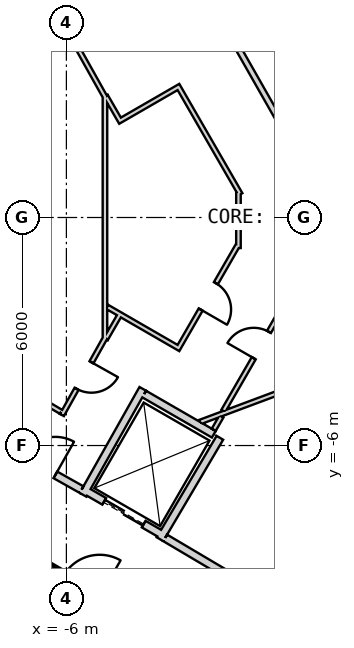
"""IFC4 building model, lengths in metres.
Left out: names, types, materials, properties, quantities, classifications, styles, units other than length and angle.
Written with IfcOpenShell. Run it as: python <this file> out.ifc"""

import sys

from ifc_helpers import new_model, si_unit, direction, frame, frame_2d, origin, place, context, subcontext, project, spatial, rectangle, extrude, element, fill, save


model = new_model("IFC4")
c1 = context("Model", 3, precision=1e-05, world=origin(), true_north=direction((0.0, 1.0)))
c2 = subcontext(c1, "Body", "Model", "MODEL_VIEW")
j1 = project(units=[si_unit("LENGTHUNIT", "METRE"), si_unit("PLANEANGLEUNIT", "RADIAN")], contexts=[c1])
p1 = place(None, origin())
s1 = spatial("IfcSite", under=j1, at=p1, CompositionType="ELEMENT")
p2 = place(p1, origin())
s2 = spatial("IfcBuilding", under=s1, at=p2, CompositionType="ELEMENT")
p3 = place(p2, frame((0.0, 0.0, 45.5)))
s3 = spatial("IfcBuildingStorey", under=s2, at=p3, CompositionType="ELEMENT", Elevation=45.5)
p4 = place(p3, frame((19.475, 2.208, 0.0), z_axis=(0.0, 0.0, 1.0), x_axis=(-0.866028369851, 0.499994862586, 0.0)))
e1 = element("IfcWall", 1, at=p4, inside=s3, PredefinedType="SHEAR", context=c2, shape_type="SweptSolid", body=[
    extrude(rectangle(XDim=31.523, YDim=0.9, at=frame_2d((15.762, 0.0))), origin(), (0.0, 0.0, 1.0), 4.1),
])
p5 = place(p4, frame((7.062, 0.0, 0.0)))
e2 = element("IfcOpeningElement", 2, at=p5, cuts=e1, PredefinedType="OPENING", context=c2, shape_type="SweptSolid", body=[
    extrude(rectangle(XDim=1.2, YDim=2.4, at=frame_2d((0.6, 1.2))), frame((0.0, 0.46, 0.0), z_axis=(0.0, -1.0, 0.0), x_axis=(1.0, 0.0, 0.0)), (0.0, 0.0, 1.0), 0.92),
])
p6 = place(p4, frame((9.762, 0.0, 0.0)))
e3 = element("IfcOpeningElement", 3, at=p6, cuts=e1, PredefinedType="OPENING", context=c2, shape_type="SweptSolid", body=[
    extrude(rectangle(XDim=1.2, YDim=2.4, at=frame_2d((0.6, 1.2))), frame((0.0, 0.46, 0.0), z_axis=(0.0, -1.0, 0.0), x_axis=(1.0, 0.0, 0.0)), (0.0, 0.0, 1.0), 0.92),
])
p7 = place(p4, frame((12.462, 0.0, 0.0)))
e4 = element("IfcOpeningElement", 4, at=p7, cuts=e1, PredefinedType="OPENING", context=c2, shape_type="SweptSolid", body=[
    extrude(rectangle(XDim=1.2, YDim=2.4, at=frame_2d((0.6, 1.2))), frame((0.0, 0.46, 0.0), z_axis=(0.0, -1.0, 0.0), x_axis=(1.0, 0.0, 0.0)), (0.0, 0.0, 1.0), 0.92),
])
p8 = place(p4, frame((15.162, 0.0, 0.0)))
e5 = element("IfcOpeningElement", 5, at=p8, cuts=e1, PredefinedType="OPENING", context=c2, shape_type="SweptSolid", body=[
    extrude(rectangle(XDim=1.2, YDim=2.4, at=frame_2d((0.6, 1.2))), frame((0.0, 0.46, 0.0), z_axis=(0.0, -1.0, 0.0), x_axis=(1.0, 0.0, 0.0)), (0.0, 0.0, 1.0), 0.92),
])
p9 = place(p4, frame((17.862, 0.0, 0.0)))
e6 = element("IfcOpeningElement", 6, at=p9, cuts=e1, PredefinedType="OPENING", context=c2, shape_type="SweptSolid", body=[
    extrude(rectangle(XDim=1.2, YDim=2.4, at=frame_2d((0.6, 1.2))), frame((0.0, 0.46, 0.0), z_axis=(0.0, -1.0, 0.0), x_axis=(1.0, 0.0, 0.0)), (0.0, 0.0, 1.0), 0.92),
])
p10 = place(p4, frame((20.562, 0.0, 0.0)))
e7 = element("IfcOpeningElement", 7, at=p10, cuts=e1, PredefinedType="OPENING", context=c2, shape_type="SweptSolid", body=[
    extrude(rectangle(XDim=1.2, YDim=2.4, at=frame_2d((0.6, 1.2))), frame((0.0, 0.46, 0.0), z_axis=(0.0, -1.0, 0.0), x_axis=(1.0, 0.0, 0.0)), (0.0, 0.0, 1.0), 0.92),
])
p11 = place(p4, frame((23.262, 0.0, 0.0)))
e8 = element("IfcOpeningElement", 8, at=p11, cuts=e1, PredefinedType="OPENING", context=c2, shape_type="SweptSolid", body=[
    extrude(rectangle(XDim=1.2, YDim=2.4, at=frame_2d((0.6, 1.2))), frame((0.0, 0.46, 0.0), z_axis=(0.0, -1.0, 0.0), x_axis=(1.0, 0.0, 0.0)), (0.0, 0.0, 1.0), 0.92),
])
p12 = place(p4, frame((3.612, 0.0, 0.0)))
e9 = element("IfcOpeningElement", 9, at=p12, cuts=e1, PredefinedType="OPENING", context=c2, shape_type="SweptSolid", body=[
    extrude(rectangle(XDim=1.2, YDim=2.4, at=frame_2d((0.6, 1.2))), frame((0.0, 0.46, 0.0), z_axis=(0.0, -1.0, 0.0), x_axis=(1.0, 0.0, 0.0)), (0.0, 0.0, 1.0), 0.92),
])
p13 = place(p4, frame((26.712, 0.0, 0.0)))
e10 = element("IfcOpeningElement", 10, at=p13, cuts=e1, PredefinedType="OPENING", context=c2, shape_type="SweptSolid", body=[
    extrude(rectangle(XDim=1.2, YDim=2.4, at=frame_2d((0.6, 1.2))), frame((0.0, 0.46, 0.0), z_axis=(0.0, -1.0, 0.0), x_axis=(1.0, 0.0, 0.0)), (0.0, 0.0, 1.0), 0.92),
])
p14 = place(p3, frame((-7.825, -17.97, 0.0), z_axis=(0.0, 0.0, 1.0), x_axis=(0.866028369851, 0.499994862586, 0.0)))
e11 = element("IfcWall", 11, at=p14, inside=s3, PredefinedType="SHEAR", context=c2, shape_type="SweptSolid", body=[
    extrude(rectangle(XDim=31.523, YDim=0.9, at=frame_2d((15.762, 0.0))), origin(), (0.0, 0.0, 1.0), 4.1),
])
p15 = place(p14, frame((7.062, 0.0, 0.0)))
e12 = element("IfcOpeningElement", 12, at=p15, cuts=e11, PredefinedType="OPENING", context=c2, shape_type="SweptSolid", body=[
    extrude(rectangle(XDim=1.2, YDim=2.4, at=frame_2d((0.6, 1.2))), frame((0.0, 0.46, 0.0), z_axis=(0.0, -1.0, 0.0), x_axis=(1.0, 0.0, 0.0)), (0.0, 0.0, 1.0), 0.92),
])
p16 = place(p14, frame((9.762, 0.0, 0.0)))
e13 = element("IfcOpeningElement", 13, at=p16, cuts=e11, PredefinedType="OPENING", context=c2, shape_type="SweptSolid", body=[
    extrude(rectangle(XDim=1.2, YDim=2.4, at=frame_2d((0.6, 1.2))), frame((0.0, 0.46, 0.0), z_axis=(0.0, -1.0, 0.0), x_axis=(1.0, 0.0, 0.0)), (0.0, 0.0, 1.0), 0.92),
])
p17 = place(p14, frame((12.462, 0.0, 0.0)))
e14 = element("IfcOpeningElement", 14, at=p17, cuts=e11, PredefinedType="OPENING", context=c2, shape_type="SweptSolid", body=[
    extrude(rectangle(XDim=1.2, YDim=2.4, at=frame_2d((0.6, 1.2))), frame((0.0, 0.46, 0.0), z_axis=(0.0, -1.0, 0.0), x_axis=(1.0, 0.0, 0.0)), (0.0, 0.0, 1.0), 0.92),
])
p18 = place(p14, frame((15.162, 0.0, 0.0)))
e15 = element("IfcOpeningElement", 15, at=p18, cuts=e11, PredefinedType="OPENING", context=c2, shape_type="SweptSolid", body=[
    extrude(rectangle(XDim=1.2, YDim=2.4, at=frame_2d((0.6, 1.2))), frame((0.0, 0.46, 0.0), z_axis=(0.0, -1.0, 0.0), x_axis=(1.0, 0.0, 0.0)), (0.0, 0.0, 1.0), 0.92),
])
p19 = place(p14, frame((17.862, 0.0, 0.0)))
e16 = element("IfcOpeningElement", 16, at=p19, cuts=e11, PredefinedType="OPENING", context=c2, shape_type="SweptSolid", body=[
    extrude(rectangle(XDim=1.2, YDim=2.4, at=frame_2d((0.6, 1.2))), frame((0.0, 0.46, 0.0), z_axis=(0.0, -1.0, 0.0), x_axis=(1.0, 0.0, 0.0)), (0.0, 0.0, 1.0), 0.92),
])
p20 = place(p14, frame((20.562, 0.0, 0.0)))
e17 = element("IfcOpeningElement", 17, at=p20, cuts=e11, PredefinedType="OPENING", context=c2, shape_type="SweptSolid", body=[
    extrude(rectangle(XDim=1.2, YDim=2.4, at=frame_2d((0.6, 1.2))), frame((0.0, 0.46, 0.0), z_axis=(0.0, -1.0, 0.0), x_axis=(1.0, 0.0, 0.0)), (0.0, 0.0, 1.0), 0.92),
])
p21 = place(p14, frame((26.712, 0.0, 0.0)))
e18 = element("IfcOpeningElement", 18, at=p21, cuts=e11, PredefinedType="OPENING", context=c2, shape_type="SweptSolid", body=[
    extrude(rectangle(XDim=1.2, YDim=2.4, at=frame_2d((0.6, 1.2))), frame((0.0, 0.46, 0.0), z_axis=(0.0, -1.0, 0.0), x_axis=(1.0, 0.0, 0.0)), (0.0, 0.0, 1.0), 0.92),
])
p22 = place(p14, frame((3.612, 0.0, 0.0)))
e19 = element("IfcOpeningElement", 19, at=p22, cuts=e11, PredefinedType="OPENING", context=c2, shape_type="SweptSolid", body=[
    extrude(rectangle(XDim=1.2, YDim=2.4, at=frame_2d((0.6, 1.2))), frame((0.0, 0.46, 0.0), z_axis=(0.0, -1.0, 0.0), x_axis=(1.0, 0.0, 0.0)), (0.0, 0.0, 1.0), 0.92),
])
p23 = place(p3, frame((-1.13, -9.831, 0.0), z_axis=(0.0, 0.0, 1.0), x_axis=(0.874269620932, 0.485440655401, 0.0)))
e20 = element("IfcWall", 20, at=p23, inside=s3, PredefinedType="PLUMBINGWALL", context=c2, shape_type="SweptSolid", body=[
    extrude(rectangle(XDim=1.845, YDim=0.2, at=frame_2d((0.922, 0.0))), origin(), (0.0, 0.0, 1.0), 3.8),
])
p24 = place(p3, frame((-4.041, -10.599, -0.3), z_axis=(0.0, 0.0, 1.0), x_axis=(-0.866047807691, 0.499961193289, 0.0)))
e21 = element("IfcWall", 21, at=p24, inside=s3, PredefinedType="SHEAR", context=c2, shape_type="SweptSolid", body=[
    extrude(rectangle(XDim=3.6, YDim=0.2, at=frame_2d((1.8, 0.0))), origin(), (0.0, 0.0, 1.0), 4.1),
])
p25 = place(p24, frame((1.25, 0.0, 0.3)))
e22 = element("IfcOpeningElement", 22, at=p25, cuts=e21, PredefinedType="OPENING", context=c2, shape_type="SweptSolid", body=[
    extrude(rectangle(XDim=1.1, YDim=2.1, at=frame_2d((0.55, 1.05))), frame((0.0, 0.11, 0.0), z_axis=(0.0, -1.0, 0.0), x_axis=(1.0, 0.0, 0.0)), (0.0, 0.0, 1.0), 0.22),
])
p26 = place(p3, frame((-3.446, -8.368, 0.0), z_axis=(0.0, 0.0, 1.0), x_axis=(-0.866024647952, 0.500001309137, 0.0)))
e23 = element("IfcWall", 23, at=p26, inside=s3, PredefinedType="PLUMBINGWALL", context=c2, shape_type="SweptSolid", body=[
    extrude(rectangle(XDim=2.4, YDim=0.2, at=frame_2d((1.2, 0.0))), origin(), (0.0, 0.0, 1.0), 3.8),
])
p27 = place(p26, frame((0.6, 0.0, 0.0)))
e24 = element("IfcOpeningElement", 24, at=p27, cuts=e23, PredefinedType="OPENING", context=c2, shape_type="SweptSolid", body=[
    extrude(rectangle(XDim=1.2, YDim=2.4, at=frame_2d((0.6, 1.2))), frame((0.0, 0.11, 0.0), z_axis=(0.0, -1.0, 0.0), x_axis=(1.0, 0.0, 0.0)), (0.0, 0.0, 1.0), 0.22),
])
p28 = place(p3, frame((-1.961, -5.796, 0.0), z_axis=(0.0, 0.0, 1.0), x_axis=(-0.508647062354, -0.860975125052, 0.0)))
e25 = element("IfcWall", 25, at=p28, inside=s3, PredefinedType="PLUMBINGWALL", context=c2, shape_type="SweptSolid", body=[
    extrude(rectangle(XDim=3.1, YDim=0.2, at=frame_2d((1.55, 0.0))), origin(), (0.0, 0.0, 1.0), 3.8),
])
p29 = place(p3, frame((-3.99, -4.509, 0.0), z_axis=(0.0, 0.0, 1.0), x_axis=(-0.491358283181, -0.870957540612, 0.0)))
e26 = element("IfcWall", 26, at=p29, inside=s3, PredefinedType="PLUMBINGWALL", context=c2, shape_type="SweptSolid", body=[
    extrude(rectangle(XDim=3.2, YDim=0.2, at=frame_2d((1.6, 0.0))), origin(), (0.0, 0.0, 1.0), 3.8),
])
p30 = place(p3, frame((-3.953, -4.646, 0.0), z_axis=(0.0, 0.0, 1.0), x_axis=(0.866060616833, -0.499939004251, 0.0)))
e27 = element("IfcWall", 27, at=p30, inside=s3, PredefinedType="PLUMBINGWALL", context=c2, shape_type="SweptSolid", body=[
    extrude(rectangle(XDim=2.115, YDim=0.2, at=frame_2d((1.057, 0.0))), origin(), (0.0, 0.0, 1.0), 3.8),
])
p31 = place(p3, frame((-3.401, -8.43, 0.0), z_axis=(0.0, 0.0, 1.0), x_axis=(0.860615607571, -0.509255118781, 0.0)))
e28 = element("IfcWall", 28, at=p31, inside=s3, PredefinedType="PARTITIONING", context=c2, shape_type="SweptSolid", body=[
    extrude(rectangle(XDim=2.581, YDim=0.2, at=frame_2d((1.29, 0.0))), origin(), (0.0, 0.0, 1.0), 3.8),
])
p32 = place(p3, frame((-7.849, -5.894, 0.0), z_axis=(0.0, 0.0, 1.0), x_axis=(0.871363259478, -0.490638431059, 0.0)))
e29 = element("IfcWall", 29, at=p32, inside=s3, PredefinedType="PARTITIONING", context=c2, shape_type="SweptSolid", body=[
    extrude(rectangle(XDim=2.581, YDim=0.2, at=frame_2d((1.291, 0.0))), origin(), (0.0, 0.0, 1.0), 3.8),
])
p33 = place(p32, frame((0.791, 0.0, 0.0)))
e30 = element("IfcOpeningElement", 30, at=p33, cuts=e29, PredefinedType="OPENING", context=c2, shape_type="SweptSolid", body=[
    extrude(rectangle(XDim=1.0, YDim=2.1, at=frame_2d((0.5, 1.05))), frame((0.0, 0.11, 0.0), z_axis=(0.0, -1.0, 0.0), x_axis=(1.0, 0.0, 0.0)), (0.0, 0.0, 1.0), 0.22),
])
p34 = place(p3, frame((-2.124, 5.586, 0.0), z_axis=(0.0, 0.0, 1.0), x_axis=(0.494514430604, -0.869169418424, 0.0)))
e31 = element("IfcWall", 31, at=p34, inside=s3, PredefinedType="PLUMBINGWALL", context=c2, shape_type="SweptSolid", body=[
    extrude(rectangle(XDim=4.534, YDim=0.15, at=frame_2d((2.267, 0.0))), origin(), (0.0, 0.0, 1.0), 3.8),
])
p35 = place(p3, frame((4.769, -2.673, 0.0), z_axis=(0.0, 0.0, 1.0), x_axis=(-0.936819599564, -0.349812861217, 0.0)))
e32 = element("IfcWall", 32, at=p35, inside=s3, PredefinedType="PARTITIONING", context=c2, shape_type="SweptSolid", body=[
    extrude(rectangle(XDim=7.739, YDim=0.12, at=frame_2d((3.87, 0.0))), origin(), (0.0, 0.0, 1.0), 3.8),
])
p36 = place(p3, frame((0.182, -1.535, 0.0), z_axis=(0.0, 0.0, 1.0), x_axis=(-0.499966268063, -0.866044878051, 0.0)))
e33 = element("IfcWall", 33, at=p36, inside=s3, PredefinedType="PARTITIONING", context=c2, shape_type="SweptSolid", body=[
    extrude(rectangle(XDim=4.103, YDim=0.12, at=frame_2d((2.051, 0.0))), origin(), (0.0, 0.0, 1.0), 3.8),
])
p37 = place(p36, frame((1.703, 0.0, 0.0)))
e34 = element("IfcOpeningElement", 34, at=p37, cuts=e33, PredefinedType="OPENING", context=c2, shape_type="SweptSolid", body=[
    extrude(rectangle(XDim=0.8, YDim=2.1, at=frame_2d((0.4, 1.05))), frame((0.0, 0.07, 0.0), z_axis=(0.0, -1.0, 0.0), x_axis=(1.0, 0.0, 0.0)), (0.0, 0.0, 1.0), 0.14),
])
p38 = place(p3, frame((-1.92, -5.235, 0.0), z_axis=(0.0, 0.0, 1.0), x_axis=(-0.499566316511, -0.86627564632, 0.0)))
e35 = element("IfcWall", 35, at=p38, inside=s3, PredefinedType="PARTITIONING", context=c2, shape_type="SweptSolid", body=[
    extrude(rectangle(XDim=0.406, YDim=0.12, at=frame_2d((0.203, 0.0))), origin(), (0.0, 0.0, 1.0), 3.8),
])
p39 = place(p3, frame((-4.985, -3.235, 0.0), z_axis=(0.0, 0.0, 1.0), x_axis=(0.0, 1.0, 0.0)))
e36 = element("IfcWall", 36, at=p39, inside=s3, PredefinedType="PARTITIONING", context=c2, shape_type="SweptSolid", body=[
    extrude(rectangle(XDim=6.469, YDim=0.12, at=frame_2d((3.235, 0.0))), origin(), (0.0, 0.0, 1.0), 3.8),
])
p40 = place(p3, frame((-6.118, -5.198, 0.0), z_axis=(0.0, 0.0, 1.0), x_axis=(0.488782681023, 0.872405576972, 0.0)))
e37 = element("IfcWall", 37, at=p40, inside=s3, PredefinedType="PARTITIONING", context=c2, shape_type="SweptSolid", body=[
    extrude(rectangle(XDim=2.322, YDim=0.12, at=frame_2d((1.161, 0.0))), origin(), (0.0, 0.0, 1.0), 3.8),
])
p41 = place(p40, frame((0.791, 0.0, 0.0)))
e38 = element("IfcOpeningElement", 38, at=p41, cuts=e37, PredefinedType="OPENING", context=c2, shape_type="SweptSolid", body=[
    extrude(rectangle(XDim=0.8, YDim=2.1, at=frame_2d((0.4, 1.05))), frame((0.0, 0.07, 0.0), z_axis=(0.0, -1.0, 0.0), x_axis=(1.0, 0.0, 0.0)), (0.0, 0.0, 1.0), 0.14),
])
p42 = place(p3, frame((-7.95, -4.041, 0.0), z_axis=(0.0, 0.0, 1.0), x_axis=(0.860112457103, -0.510104461004, 0.0)))
e39 = element("IfcWall", 39, at=p42, inside=s3, PredefinedType="PARTITIONING", context=c2, shape_type="SweptSolid", body=[
    extrude(rectangle(XDim=2.104, YDim=0.12, at=frame_2d((1.052, 0.0))), origin(), (0.0, 0.0, 1.0), 3.8),
])
p43 = place(p3, frame((-6.037, 5.176, 0.0), z_axis=(0.0, 0.0, 1.0), x_axis=(-0.860106072674, -0.510115225953, 0.0)))
e40 = element("IfcWall", 40, at=p43, inside=s3, PredefinedType="PARTITIONING", context=c2, shape_type="SweptSolid", body=[
    extrude(rectangle(XDim=2.225, YDim=0.12, at=frame_2d((1.112, 0.0))), origin(), (0.0, 0.0, 1.0), 3.8),
])
p44 = place(p3, frame((-4.983, 3.172, 0.0), z_axis=(0.0, 0.0, 1.0), x_axis=(-0.488728310113, 0.872436037136, 0.0)))
e41 = element("IfcWall", 41, at=p44, inside=s3, PredefinedType="PARTITIONING", context=c2, shape_type="SweptSolid", body=[
    extrude(rectangle(XDim=2.201, YDim=0.12, at=frame_2d((1.101, 0.0))), origin(), (0.0, 0.0, 1.0), 3.8),
])
p45 = place(p3, frame((-4.558, 2.495, 0.0), z_axis=(0.0, 0.0, 1.0), x_axis=(-0.499757756434, 0.866165218006, 0.0)))
e42 = element("IfcWall", 42, at=p45, inside=s3, PredefinedType="PARTITIONING", context=c2, shape_type="SweptSolid", body=[
    extrude(rectangle(XDim=0.798, YDim=0.12, at=frame_2d((0.399, 0.0))), origin(), (0.0, 0.0, 1.0), 3.8),
])
p46 = place(p3, frame((-2.999, 3.465, 0.0), z_axis=(0.0, 0.0, 1.0), x_axis=(-0.866059624469, -0.499940723351, 0.0)))
e43 = element("IfcWall", 43, at=p46, inside=s3, PredefinedType="PARTITIONING", context=c2, shape_type="SweptSolid", body=[
    extrude(rectangle(XDim=1.775, YDim=0.12, at=frame_2d((0.888, 0.0))), origin(), (0.0, 0.0, 1.0), 3.8),
])
p47 = place(p3, frame((-1.42, 0.61, 0.0), z_axis=(0.0, 0.0, 1.0), x_axis=(-0.500034908033, 0.866005248684, 0.0)))
e44 = element("IfcWall", 44, at=p47, inside=s3, PredefinedType="PARTITIONING", context=c2, shape_type="SweptSolid", body=[
    extrude(rectangle(XDim=3.201, YDim=0.12, at=frame_2d((1.601, 0.0))), origin(), (0.0, 0.0, 1.0), 3.8),
])
p48 = place(p3, frame((-1.472, -0.804, 0.0), z_axis=(0.0, 0.0, 1.0), x_axis=(0.0, 1.0, 0.0)))
e45 = element("IfcWall", 45, at=p48, inside=s3, PredefinedType="PARTITIONING", context=c2, shape_type="SweptSolid", body=[
    extrude(rectangle(XDim=1.485, YDim=0.12, at=frame_2d((0.743, 0.0))), origin(), (0.0, 0.0, 1.0), 3.8),
])
p49 = place(p3, frame((-3.081, -3.487, 0.0), z_axis=(0.0, 0.0, 1.0), x_axis=(0.500013115284, 0.866017831539, 0.0)))
e46 = element("IfcWall", 46, at=p49, inside=s3, PredefinedType="PARTITIONING", context=c2, shape_type="SweptSolid", body=[
    extrude(rectangle(XDim=3.199, YDim=0.12, at=frame_2d((1.6, 0.0))), origin(), (0.0, 0.0, 1.0), 3.8),
])
p50 = place(p49, frame((1.229, 0.0, 0.0)))
e47 = element("IfcOpeningElement", 47, at=p50, cuts=e46, PredefinedType="OPENING", context=c2, shape_type="SweptSolid", body=[
    extrude(rectangle(XDim=0.8, YDim=2.1, at=frame_2d((0.4, 1.05))), frame((0.0, 0.07, 0.0), z_axis=(0.0, -1.0, 0.0), x_axis=(1.0, 0.0, 0.0)), (0.0, 0.0, 1.0), 0.14),
])
p51 = place(p3, frame((-4.925, -2.353, 0.0), z_axis=(0.0, 0.0, 1.0), x_axis=(0.86604260665, -0.49997020258, 0.0)))
e48 = element("IfcWall", 48, at=p51, inside=s3, PredefinedType="PARTITIONING", context=c2, shape_type="SweptSolid", body=[
    extrude(rectangle(XDim=2.104, YDim=0.12, at=frame_2d((1.052, 0.0))), origin(), (0.0, 0.0, 1.0), 3.8),
])
p52 = place(p3, frame((-4.957, -3.187, 0.0), z_axis=(0.0, 0.0, 1.0), x_axis=(0.499971721724, 0.866041729639, 0.0)))
e49 = element("IfcWall", 49, at=p52, inside=s3, PredefinedType="PARTITIONING", context=c2, shape_type="SweptSolid", body=[
    extrude(rectangle(XDim=0.678, YDim=0.12, at=frame_2d((0.339, 0.0))), origin(), (0.0, 0.0, 1.0), 3.8),
])
p53 = place(p3, frame((-6.436, -22.075, 0.0), z_axis=(0.0, 0.0, 1.0), x_axis=(0.866022453651, 0.500005109747, 0.0)))
e50 = element("IfcWall", 50, at=p53, inside=s3, PredefinedType="PARTITIONING", context=c2, shape_type="SweptSolid", body=[
    extrude(rectangle(XDim=33.022, YDim=0.2, at=frame_2d((16.511, 0.0))), origin(), (0.0, 0.0, 1.0), 2.98),
])
p54 = place(p53, frame((20.89, 0.0, 0.0)))
e51 = element("IfcOpeningElement", 51, at=p54, cuts=e50, PredefinedType="OPENING", context=c2, shape_type="SweptSolid", body=[
    extrude(rectangle(XDim=1.0, YDim=2.1, at=frame_2d((0.5, 1.05))), frame((0.0, 0.11, 0.0), z_axis=(0.0, -1.0, 0.0), x_axis=(1.0, 0.0, 0.0)), (0.0, 0.0, 1.0), 0.22),
])
p55 = place(p53, frame((4.429, 0.0, 0.0)))
e52 = element("IfcOpeningElement", 52, at=p55, cuts=e50, PredefinedType="OPENING", context=c2, shape_type="SweptSolid", body=[
    extrude(rectangle(XDim=1.0, YDim=2.1, at=frame_2d((0.5, 1.05))), frame((0.0, 0.11, 0.0), z_axis=(0.0, -1.0, 0.0), x_axis=(1.0, 0.0, 0.0)), (0.0, 0.0, 1.0), 0.22),
])
p56 = place(p33, origin())
e53 = element("IfcDoor", 53, at=p56, inside=s3, OperationType="SINGLE_SWING_LEFT", PredefinedType="USERDEFINED", context=c2, shape_type="SweptSolid", body=[
    extrude(rectangle(XDim=1.0, YDim=2.1, at=frame_2d((0.5, 1.05))), frame((0.0, 0.025, 0.0), z_axis=(0.0, -1.0, 0.0), x_axis=(1.0, 0.0, 0.0)), (0.0, 0.0, 1.0), 0.05),
])
fill(e30, e53)
p57 = place(p27, origin())
e54 = element("IfcDoor", 54, at=p57, inside=s3, OperationType="SLIDING_TO_LEFT", PredefinedType="USERDEFINED", context=c2, shape_type="SweptSolid", body=[
    extrude(rectangle(XDim=1.2, YDim=2.4, at=frame_2d((0.6, 1.2))), frame((0.0, 0.025, 0.0), z_axis=(0.0, -1.0, 0.0), x_axis=(1.0, 0.0, 0.0)), (0.0, 0.0, 1.0), 0.05),
])
fill(e24, e54)
p58 = place(p37, origin())
e55 = element("IfcDoor", 55, at=p58, inside=s3, OperationType="SINGLE_SWING_LEFT", PredefinedType="USERDEFINED", context=c2, shape_type="SweptSolid", body=[
    extrude(rectangle(XDim=0.8, YDim=2.1, at=frame_2d((0.4, 1.05))), frame((0.0, 0.025, 0.0), z_axis=(0.0, -1.0, 0.0), x_axis=(1.0, 0.0, 0.0)), (0.0, 0.0, 1.0), 0.05),
])
fill(e34, e55)
p59 = place(p41, origin())
e56 = element("IfcDoor", 56, at=p59, inside=s3, OperationType="SINGLE_SWING_RIGHT", PredefinedType="USERDEFINED", context=c2, shape_type="SweptSolid", body=[
    extrude(rectangle(XDim=0.8, YDim=2.1, at=frame_2d((0.4, 1.05))), frame((0.0, 0.025, 0.0), z_axis=(0.0, -1.0, 0.0), x_axis=(1.0, 0.0, 0.0)), (0.0, 0.0, 1.0), 0.05),
])
fill(e38, e56)
p60 = place(p50, origin())
e57 = element("IfcDoor", 57, at=p60, inside=s3, OperationType="SINGLE_SWING_LEFT", PredefinedType="USERDEFINED", context=c2, shape_type="SweptSolid", body=[
    extrude(rectangle(XDim=0.8, YDim=2.1, at=frame_2d((0.4, 1.05))), frame((0.0, 0.025, 0.0), z_axis=(0.0, -1.0, 0.0), x_axis=(1.0, 0.0, 0.0)), (0.0, 0.0, 1.0), 0.05),
])
fill(e47, e57)
save(model, sys.argv[1])
